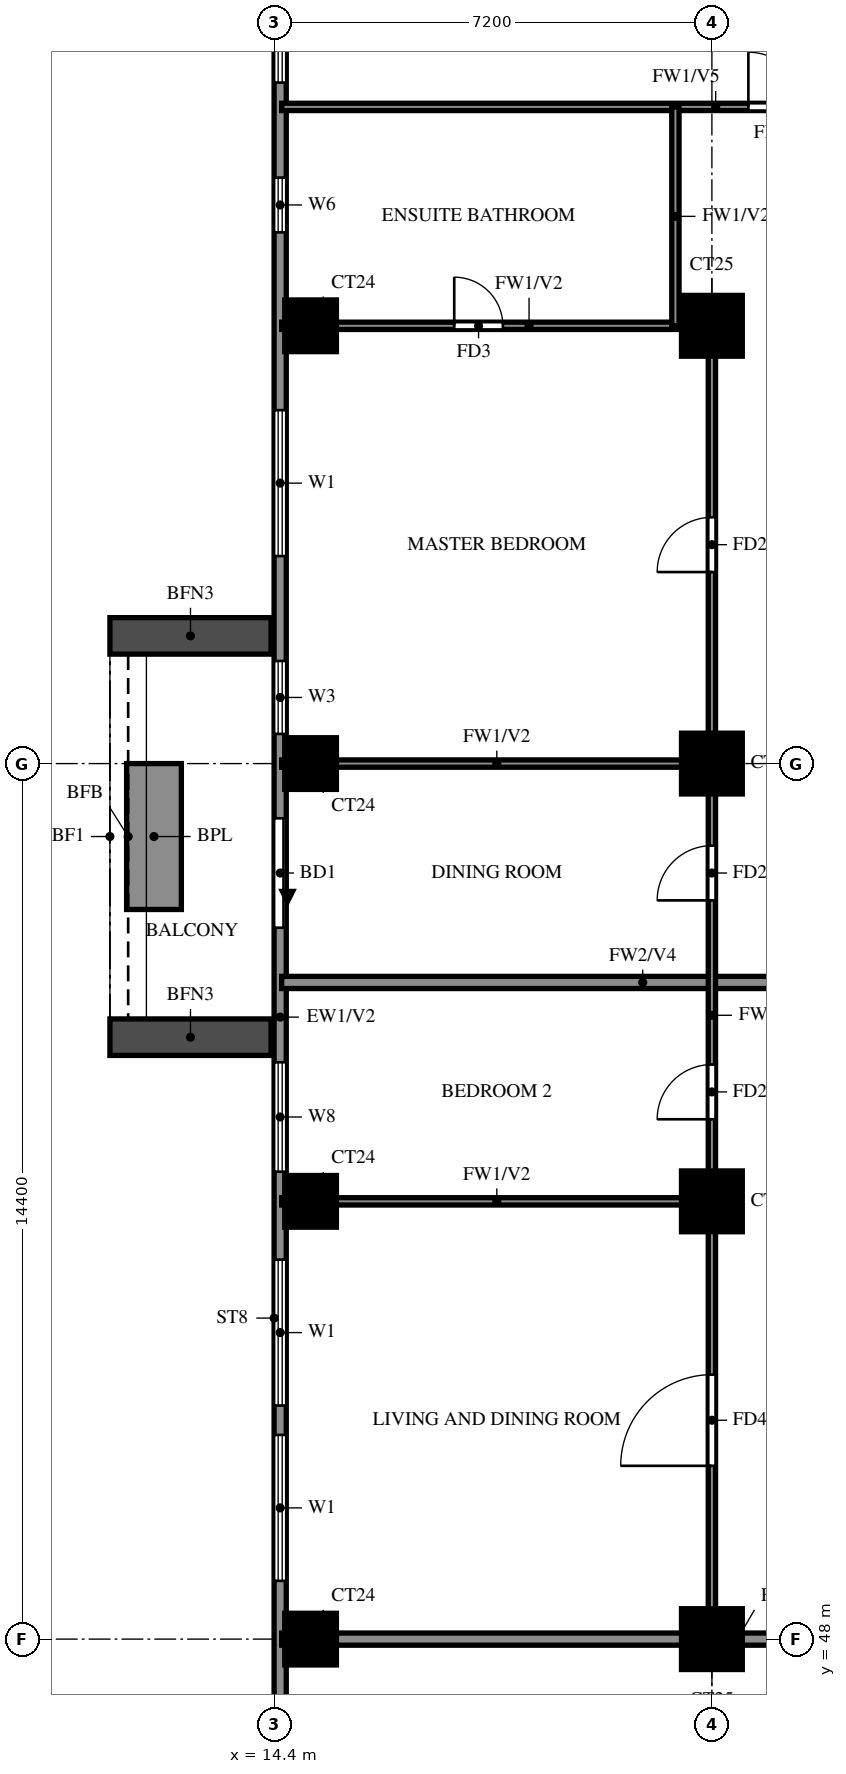
"""IFC4 building model, lengths in metres.
Left out: names, types, materials, properties, quantities, classifications, styles, units other than length and angle.
Written with IfcOpenShell. Run it as: python <this file> out.ifc"""

import sys

from ifc_helpers import new_model, si_unit, direction, frame, frame_2d, origin, origin_2d, place, context, subcontext, project, spatial, rectangle, extrude, source, transform, mapped, element, fill, save


model = new_model("IFC4")
c1 = context("Model", 3, precision=1e-05, world=origin(), true_north=direction((0.0, 1.0)))
c2 = subcontext(c1, "Body", "Model", "MODEL_VIEW")
j1 = project(units=[si_unit("LENGTHUNIT", "METRE"), si_unit("PLANEANGLEUNIT", "RADIAN")], contexts=[c1])
p1 = place(None, origin())
s1 = spatial("IfcSite", under=j1, at=p1, CompositionType="ELEMENT")
p2 = place(p1, origin())
s2 = spatial("IfcBuilding", under=s1, at=p2, CompositionType="ELEMENT")
p3 = place(p2, frame((0.0, 0.0, 160.5)))
s3 = spatial("IfcBuildingStorey", under=s2, at=p3, CompositionType="ELEMENT", Elevation=160.5)
m1 = source(origin(), c2, "Body", "SweptSolid", [
    extrude(rectangle(XDim=0.85, YDim=0.85, at=origin_2d()), origin(), (0.0, 0.0, 1.0), 3.2),
])
p4 = place(p3, frame((15.0, 48.0, 0.0), z_axis=(0.0, 0.0, 1.0), x_axis=(1.0, 0.0, 0.0)))
e1 = element("IfcColumn", 1, at=p4, inside=s3, PredefinedType="COLUMN", context=c2, shape_type="MappedRepresentation", body=[
    mapped(m1, transform((0.0, 0.0, 0.0))),
])
m2 = source(origin(), c2, "Body", "SweptSolid", [
    extrude(rectangle(XDim=1.0, YDim=1.0, at=origin_2d()), origin(), (0.0, 0.0, 1.0), 3.2),
])
p5 = place(p3, frame((21.6, 48.0, 0.0), z_axis=(0.0, 0.0, 1.0), x_axis=(1.0, 0.0, 0.0)))
e2 = element("IfcColumn", 2, at=p5, inside=s3, PredefinedType="COLUMN", context=c2, shape_type="MappedRepresentation", body=[
    mapped(m2, transform((0.0, 0.0, 0.0))),
])
p6 = place(p3, frame((15.0, 55.2, 0.0), z_axis=(0.0, 0.0, 1.0), x_axis=(1.0, 0.0, 0.0)))
e3 = element("IfcColumn", 3, at=p6, inside=s3, PredefinedType="COLUMN", context=c2, shape_type="MappedRepresentation", body=[
    mapped(m1, transform((0.0, 0.0, 0.0))),
])
p7 = place(p3, frame((21.6, 55.2, 0.0), z_axis=(0.0, 0.0, 1.0), x_axis=(1.0, 0.0, 0.0)))
e4 = element("IfcColumn", 4, at=p7, inside=s3, PredefinedType="COLUMN", context=c2, shape_type="MappedRepresentation", body=[
    mapped(m2, transform((0.0, 0.0, 0.0))),
])
p8 = place(p3, frame((15.0, 62.4, 0.0), z_axis=(0.0, 0.0, 1.0), x_axis=(1.0, 0.0, 0.0)))
e5 = element("IfcColumn", 5, at=p8, inside=s3, PredefinedType="COLUMN", context=c2, shape_type="MappedRepresentation", body=[
    mapped(m1, transform((0.0, 0.0, 0.0))),
])
p9 = place(p3, frame((21.6, 62.4, 0.0), z_axis=(0.0, 0.0, 1.0), x_axis=(1.0, 0.0, 0.0)))
e6 = element("IfcColumn", 6, at=p9, inside=s3, PredefinedType="COLUMN", context=c2, shape_type="MappedRepresentation", body=[
    mapped(m2, transform((0.0, 0.0, 0.0))),
])
p10 = place(p3, frame((15.0, 69.6, 0.0), z_axis=(0.0, 0.0, 1.0), x_axis=(1.0, 0.0, 0.0)))
e7 = element("IfcColumn", 7, at=p10, inside=s3, PredefinedType="COLUMN", context=c2, shape_type="MappedRepresentation", body=[
    mapped(m1, transform((0.0, 0.0, 0.0))),
])
p11 = place(p3, frame((21.6, 69.6, 0.0), z_axis=(0.0, 0.0, 1.0), x_axis=(1.0, 0.0, 0.0)))
e8 = element("IfcColumn", 8, at=p11, inside=s3, PredefinedType="COLUMN", context=c2, shape_type="MappedRepresentation", body=[
    mapped(m2, transform((0.0, 0.0, 0.0))),
])
p12 = place(p3, frame((14.5, 76.6, 0.0), z_axis=(0.0, 0.0, 1.0), x_axis=(0.0, -1.0, 0.0)))
e9 = element("IfcWall", 9, at=p12, inside=s3, PredefinedType="SOLIDWALL", context=c2, shape_type="SweptSolid", body=[
    extrude(rectangle(XDim=33.4, YDim=0.2, at=frame_2d((16.7, 0.0))), origin(), (0.0, 0.0, 1.0), 3.2),
])
p13 = place(p12, frame((15.1, 0.0, 0.0)))
e10 = element("IfcOpeningElement", 10, at=p13, cuts=e9, PredefinedType="OPENING", context=c2, shape_type="SweptSolid", body=[
    extrude(rectangle(XDim=1.8, YDim=2.4, at=frame_2d((0.9, 1.2))), frame((0.0, 0.11, 0.0), z_axis=(0.0, -1.0, 0.0), x_axis=(1.0, 0.0, 0.0)), (0.0, 0.0, 1.0), 0.22),
])
p14 = place(p12, frame((29.887, 0.0, 0.6)))
e11 = element("IfcOpeningElement", 11, at=p14, cuts=e9, PredefinedType="OPENING", context=c2, shape_type="SweptSolid", body=[
    extrude(rectangle(XDim=2.4, YDim=2.4, at=frame_2d((1.2, 1.2))), frame((0.0, 0.11, 0.0), z_axis=(0.0, -1.0, 0.0), x_axis=(1.0, 0.0, 0.0)), (0.0, 0.0, 1.0), 0.22),
])
p15 = place(p12, frame((22.358, 0.0, 0.6)))
e12 = element("IfcOpeningElement", 12, at=p15, cuts=e9, PredefinedType="OPENING", context=c2, shape_type="SweptSolid", body=[
    extrude(rectangle(XDim=2.4, YDim=2.4, at=frame_2d((1.2, 1.2))), frame((0.0, 0.11, 0.0), z_axis=(0.0, -1.0, 0.0), x_axis=(1.0, 0.0, 0.0)), (0.0, 0.0, 1.0), 0.22),
])
p16 = place(p12, frame((25.242, 0.0, 0.6)))
e13 = element("IfcOpeningElement", 13, at=p16, cuts=e9, PredefinedType="OPENING", context=c2, shape_type="SweptSolid", body=[
    extrude(rectangle(XDim=2.4, YDim=2.4, at=frame_2d((1.2, 1.2))), frame((0.0, 0.11, 0.0), z_axis=(0.0, -1.0, 0.0), x_axis=(1.0, 0.0, 0.0)), (0.0, 0.0, 1.0), 0.22),
])
p17 = place(p12, frame((19.113, 0.0, 0.6)))
e14 = element("IfcOpeningElement", 14, at=p17, cuts=e9, PredefinedType="OPENING", context=c2, shape_type="SweptSolid", body=[
    extrude(rectangle(XDim=1.8, YDim=2.4, at=frame_2d((0.9, 1.2))), frame((0.0, 0.11, 0.0), z_axis=(0.0, -1.0, 0.0), x_axis=(1.0, 0.0, 0.0)), (0.0, 0.0, 1.0), 0.22),
])
p18 = place(p12, frame((8.387, 0.0, 0.6)))
e15 = element("IfcOpeningElement", 15, at=p18, cuts=e9, PredefinedType="OPENING", context=c2, shape_type="SweptSolid", body=[
    extrude(rectangle(XDim=2.4, YDim=2.4, at=frame_2d((1.2, 1.2))), frame((0.0, 0.11, 0.0), z_axis=(0.0, -1.0, 0.0), x_axis=(1.0, 0.0, 0.0)), (0.0, 0.0, 1.0), 0.22),
])
p19 = place(p12, frame((12.512, 0.0, 0.6)))
e16 = element("IfcOpeningElement", 16, at=p19, cuts=e9, PredefinedType="OPENING", context=c2, shape_type="SweptSolid", body=[
    extrude(rectangle(XDim=1.2, YDim=2.4, at=frame_2d((0.6, 1.2))), frame((0.0, 0.11, 0.0), z_axis=(0.0, -1.0, 0.0), x_axis=(1.0, 0.0, 0.0)), (0.0, 0.0, 1.0), 0.22),
])
p20 = place(p12, frame((4.562, 0.0, 1.5)))
e17 = element("IfcOpeningElement", 17, at=p20, cuts=e9, PredefinedType="OPENING", context=c2, shape_type="SweptSolid", body=[
    extrude(rectangle(XDim=0.9, YDim=0.9, at=frame_2d((0.45, 0.45))), frame((0.0, 0.11, 0.0), z_axis=(0.0, -1.0, 0.0), x_axis=(1.0, 0.0, 0.0)), (0.0, 0.0, 1.0), 0.22),
])
p21 = place(p12, frame((0.6, 0.0, 0.6)))
e18 = element("IfcOpeningElement", 18, at=p21, cuts=e9, PredefinedType="OPENING", context=c2, shape_type="SweptSolid", body=[
    extrude(rectangle(XDim=2.4, YDim=2.4, at=frame_2d((1.2, 1.2))), frame((0.0, 0.11, 0.0), z_axis=(0.0, -1.0, 0.0), x_axis=(1.0, 0.0, 0.0)), (0.0, 0.0, 1.0), 0.22),
])
for number, where, z_axis, x_axis in (
    (19, (14.35, 64.5, 0.0), (0.0, 0.0, 1.0), (-1.0, 0.0, 0.0)),
    (20, (14.35, 57.9, 0.0), (0.0, 0.0, 1.0), (-1.0, 0.0, 0.0)),
):
    element("IfcWall", number, at=place(p3, frame(where, z_axis=z_axis, x_axis=x_axis)), inside=s3, PredefinedType="SOLIDWALL", context=c2, shape_type="SweptSolid", body=[
        extrude(rectangle(XDim=2.65, YDim=0.6, at=frame_2d((1.325, 0.0))), origin(), (0.0, 0.0, 1.0), 2.85),
    ])
p22 = place(p3, frame((12.425, 62.4, 0.0), z_axis=(0.0, 0.0, 1.0), x_axis=(0.0, -1.0, 0.0)))
e21 = element("IfcWall", 21, at=p22, inside=s3, PredefinedType="SOLIDWALL", context=c2, shape_type="SweptSolid", body=[
    extrude(rectangle(XDim=2.4, YDim=0.9, at=frame_2d((1.2, 0.0))), origin(), (0.0, 0.0, 1.0), 0.9),
])
p23 = place(p3, frame((14.525, 48.0, 0.0), z_axis=(0.0, 0.0, 1.0), x_axis=(1.0, 0.0, 0.0)))
e22 = element("IfcWall", 22, at=p23, inside=s3, PredefinedType="SOLIDWALL", context=c2, shape_type="SweptSolid", body=[
    extrude(rectangle(XDim=14.275, YDim=0.2, at=frame_2d((7.138, 0.0))), origin(), (0.0, 0.0, 1.0), 3.2),
])
p24 = place(p3, frame((14.525, 58.8, 0.0), z_axis=(0.0, 0.0, 1.0), x_axis=(1.0, 0.0, 0.0)))
e23 = element("IfcWall", 23, at=p24, inside=s3, PredefinedType="SOLIDWALL", context=c2, shape_type="SweptSolid", body=[
    extrude(rectangle(XDim=11.875, YDim=0.2, at=frame_2d((5.938, 0.0))), origin(), (0.0, 0.0, 1.0), 2.3),
])
for number, where, z_axis, x_axis in (
    (24, (14.525, 55.2, 0.0), (0.0, 0.0, 1.0), (1.0, 0.0, 0.0)),
    (25, (14.525, 62.4, 0.0), (0.0, 0.0, 1.0), (1.0, 0.0, 0.0)),
):
    element("IfcWall", number, at=place(p3, frame(where, z_axis=z_axis, x_axis=x_axis)), inside=s3, PredefinedType="PARTITIONING", context=c2, shape_type="SweptSolid", body=[
        extrude(rectangle(XDim=7.075, YDim=0.12, at=frame_2d((3.538, 0.0))), origin(), (0.0, 0.0, 1.0), 3.2),
    ])
p25 = place(p3, frame((14.525, 69.6, 0.0), z_axis=(0.0, 0.0, 1.0), x_axis=(1.0, 0.0, 0.0)))
e26 = element("IfcWall", 26, at=p25, inside=s3, PredefinedType="PARTITIONING", context=c2, shape_type="SweptSolid", body=[
    extrude(rectangle(XDim=7.075, YDim=0.12, at=frame_2d((3.538, 0.0))), origin(), (0.0, 0.0, 1.0), 3.2),
])
p26 = place(p25, frame((2.837, 0.0, 0.0)))
e27 = element("IfcOpeningElement", 27, at=p26, cuts=e26, PredefinedType="OPENING", context=c2, shape_type="SweptSolid", body=[
    extrude(rectangle(XDim=0.8, YDim=2.1, at=frame_2d((0.4, 1.05))), frame((0.0, 0.07, 0.0), z_axis=(0.0, -1.0, 0.0), x_axis=(1.0, 0.0, 0.0)), (0.0, 0.0, 1.0), 0.14),
])
p27 = place(p3, frame((14.525, 73.2, 0.0), z_axis=(0.0, 0.0, 1.0), x_axis=(1.0, 0.0, 0.0)))
e28 = element("IfcWall", 28, at=p27, inside=s3, PredefinedType="PARTITIONING", context=c2, shape_type="SweptSolid", body=[
    extrude(rectangle(XDim=14.275, YDim=0.12, at=frame_2d((7.138, 0.0))), origin(), (0.0, 0.0, 1.0), 2.3),
])
p28 = place(p27, frame((7.675, 0.0, 0.0)))
e29 = element("IfcOpeningElement", 29, at=p28, cuts=e28, PredefinedType="OPENING", context=c2, shape_type="SweptSolid", body=[
    extrude(rectangle(XDim=0.9, YDim=2.1, at=frame_2d((0.45, 1.05))), frame((0.0, 0.07, 0.0), z_axis=(0.0, -1.0, 0.0), x_axis=(1.0, 0.0, 0.0)), (0.0, 0.0, 1.0), 0.14),
])
p29 = place(p3, frame((21.0, 69.6, 0.0), z_axis=(0.0, 0.0, 1.0), x_axis=(0.0, 1.0, 0.0)))
e30 = element("IfcWall", 30, at=p29, inside=s3, PredefinedType="PARTITIONING", context=c2, shape_type="SweptSolid", body=[
    extrude(rectangle(XDim=3.6, YDim=0.12, at=frame_2d((1.8, 0.0))), origin(), (0.0, 0.0, 1.0), 3.2),
])
p30 = place(p3, frame((21.6, 48.0, 0.0), z_axis=(0.0, 0.0, 1.0), x_axis=(0.0, 1.0, 0.0)))
e31 = element("IfcWall", 31, at=p30, inside=s3, PredefinedType="PARTITIONING", context=c2, shape_type="SweptSolid", body=[
    extrude(rectangle(XDim=21.6, YDim=0.12, at=frame_2d((10.8, 0.0))), origin(), (0.0, 0.0, 1.0), 3.2),
])
p31 = place(p30, frame((2.85, 0.0, 0.0)))
e32 = element("IfcOpeningElement", 32, at=p31, cuts=e31, PredefinedType="OPENING", context=c2, shape_type="SweptSolid", body=[
    extrude(rectangle(XDim=1.5, YDim=2.1, at=frame_2d((0.75, 1.05))), frame((0.0, 0.07, 0.0), z_axis=(0.0, -1.0, 0.0), x_axis=(1.0, 0.0, 0.0)), (0.0, 0.0, 1.0), 0.14),
])
p32 = place(p30, frame((8.55, 0.0, 0.0)))
e33 = element("IfcOpeningElement", 33, at=p32, cuts=e31, PredefinedType="OPENING", context=c2, shape_type="SweptSolid", body=[
    extrude(rectangle(XDim=0.9, YDim=2.1, at=frame_2d((0.45, 1.05))), frame((0.0, 0.07, 0.0), z_axis=(0.0, -1.0, 0.0), x_axis=(1.0, 0.0, 0.0)), (0.0, 0.0, 1.0), 0.14),
])
p33 = place(p30, frame((12.15, 0.0, 0.0)))
e34 = element("IfcOpeningElement", 34, at=p33, cuts=e31, PredefinedType="OPENING", context=c2, shape_type="SweptSolid", body=[
    extrude(rectangle(XDim=0.9, YDim=2.1, at=frame_2d((0.45, 1.05))), frame((0.0, 0.07, 0.0), z_axis=(0.0, -1.0, 0.0), x_axis=(1.0, 0.0, 0.0)), (0.0, 0.0, 1.0), 0.14),
])
p34 = place(p30, frame((17.55, 0.0, 0.0)))
e35 = element("IfcOpeningElement", 35, at=p34, cuts=e31, PredefinedType="OPENING", context=c2, shape_type="SweptSolid", body=[
    extrude(rectangle(XDim=0.9, YDim=2.1, at=frame_2d((0.45, 1.05))), frame((0.0, 0.07, 0.0), z_axis=(0.0, -1.0, 0.0), x_axis=(1.0, 0.0, 0.0)), (0.0, 0.0, 1.0), 0.14),
])
p35 = place(p13, origin())
e36 = element("IfcDoor", 36, at=p35, inside=s3, OperationType="DOUBLE_DOOR_SLIDING", PredefinedType="DOOR", context=c2, shape_type="SweptSolid", body=[
    extrude(rectangle(XDim=1.8, YDim=2.4, at=frame_2d((0.9, 1.2))), frame((0.0, 0.025, 0.0), z_axis=(0.0, -1.0, 0.0), x_axis=(1.0, 0.0, 0.0)), (0.0, 0.0, 1.0), 0.05),
])
fill(e10, e36)
p36 = place(p15, origin())
e37 = element("IfcWindow", 37, at=p36, inside=s3, PartitioningType="DOUBLE_PANEL_VERTICAL", PredefinedType="WINDOW", context=c2, shape_type="SweptSolid", body=[
    extrude(rectangle(XDim=2.4, YDim=2.4, at=frame_2d((1.2, 1.2))), frame((0.0, 0.03, 0.0), z_axis=(0.0, -1.0, 0.0), x_axis=(1.0, 0.0, 0.0)), (0.0, 0.0, 1.0), 0.06),
])
fill(e12, e37)
p37 = place(p16, origin())
e38 = element("IfcWindow", 38, at=p37, inside=s3, PartitioningType="DOUBLE_PANEL_VERTICAL", PredefinedType="WINDOW", context=c2, shape_type="SweptSolid", body=[
    extrude(rectangle(XDim=2.4, YDim=2.4, at=frame_2d((1.2, 1.2))), frame((0.0, 0.03, 0.0), z_axis=(0.0, -1.0, 0.0), x_axis=(1.0, 0.0, 0.0)), (0.0, 0.0, 1.0), 0.06),
])
fill(e13, e38)
p38 = place(p17, origin())
e39 = element("IfcWindow", 39, at=p38, inside=s3, PartitioningType="DOUBLE_PANEL_VERTICAL", PredefinedType="WINDOW", context=c2, shape_type="SweptSolid", body=[
    extrude(rectangle(XDim=1.8, YDim=2.4, at=frame_2d((0.9, 1.2))), frame((0.0, 0.03, 0.0), z_axis=(0.0, -1.0, 0.0), x_axis=(1.0, 0.0, 0.0)), (0.0, 0.0, 1.0), 0.06),
])
fill(e14, e39)
p39 = place(p18, origin())
e40 = element("IfcWindow", 40, at=p39, inside=s3, PartitioningType="DOUBLE_PANEL_VERTICAL", PredefinedType="WINDOW", context=c2, shape_type="SweptSolid", body=[
    extrude(rectangle(XDim=2.4, YDim=2.4, at=frame_2d((1.2, 1.2))), frame((0.0, 0.03, 0.0), z_axis=(0.0, -1.0, 0.0), x_axis=(1.0, 0.0, 0.0)), (0.0, 0.0, 1.0), 0.06),
])
fill(e15, e40)
p40 = place(p19, origin())
e41 = element("IfcWindow", 41, at=p40, inside=s3, PartitioningType="SINGLE_PANEL", PredefinedType="WINDOW", context=c2, shape_type="SweptSolid", body=[
    extrude(rectangle(XDim=1.2, YDim=2.4, at=frame_2d((0.6, 1.2))), frame((0.0, 0.03, 0.0), z_axis=(0.0, -1.0, 0.0), x_axis=(1.0, 0.0, 0.0)), (0.0, 0.0, 1.0), 0.06),
])
fill(e16, e41)
p41 = place(p20, origin())
e42 = element("IfcWindow", 42, at=p41, inside=s3, PartitioningType="SINGLE_PANEL", PredefinedType="WINDOW", context=c2, shape_type="SweptSolid", body=[
    extrude(rectangle(XDim=0.9, YDim=0.9, at=frame_2d((0.45, 0.45))), frame((0.0, 0.03, 0.0), z_axis=(0.0, -1.0, 0.0), x_axis=(1.0, 0.0, 0.0)), (0.0, 0.0, 1.0), 0.06),
])
fill(e17, e42)
p42 = place(p21, origin())
e43 = element("IfcWindow", 43, at=p42, inside=s3, PartitioningType="DOUBLE_PANEL_VERTICAL", PredefinedType="WINDOW", context=c2, shape_type="SweptSolid", body=[
    extrude(rectangle(XDim=2.4, YDim=2.4, at=frame_2d((1.2, 1.2))), frame((0.0, 0.03, 0.0), z_axis=(0.0, -1.0, 0.0), x_axis=(1.0, 0.0, 0.0)), (0.0, 0.0, 1.0), 0.06),
])
fill(e18, e43)
p43 = place(p31, origin())
e44 = element("IfcDoor", 44, at=p43, inside=s3, OperationType="SINGLE_SWING_LEFT", PredefinedType="DOOR", context=c2, shape_type="SweptSolid", body=[
    extrude(rectangle(XDim=1.5, YDim=2.1, at=frame_2d((0.75, 1.05))), frame((0.0, 0.025, 0.0), z_axis=(0.0, -1.0, 0.0), x_axis=(1.0, 0.0, 0.0)), (0.0, 0.0, 1.0), 0.05),
])
fill(e32, e44)
p44 = place(p32, origin())
e45 = element("IfcDoor", 45, at=p44, inside=s3, OperationType="SINGLE_SWING_RIGHT", PredefinedType="DOOR", context=c2, shape_type="SweptSolid", body=[
    extrude(rectangle(XDim=0.9, YDim=2.1, at=frame_2d((0.45, 1.05))), frame((0.0, 0.025, 0.0), z_axis=(0.0, -1.0, 0.0), x_axis=(1.0, 0.0, 0.0)), (0.0, 0.0, 1.0), 0.05),
])
fill(e33, e45)
p45 = place(p33, origin())
e46 = element("IfcDoor", 46, at=p45, inside=s3, OperationType="SINGLE_SWING_LEFT", PredefinedType="DOOR", context=c2, shape_type="SweptSolid", body=[
    extrude(rectangle(XDim=0.9, YDim=2.1, at=frame_2d((0.45, 1.05))), frame((0.0, 0.025, 0.0), z_axis=(0.0, -1.0, 0.0), x_axis=(1.0, 0.0, 0.0)), (0.0, 0.0, 1.0), 0.05),
])
fill(e34, e46)
p46 = place(p34, origin())
e47 = element("IfcDoor", 47, at=p46, inside=s3, OperationType="SINGLE_SWING_LEFT", PredefinedType="DOOR", context=c2, shape_type="SweptSolid", body=[
    extrude(rectangle(XDim=0.9, YDim=2.1, at=frame_2d((0.45, 1.05))), frame((0.0, 0.025, 0.0), z_axis=(0.0, -1.0, 0.0), x_axis=(1.0, 0.0, 0.0)), (0.0, 0.0, 1.0), 0.05),
])
fill(e35, e47)
p47 = place(p26, origin())
e48 = element("IfcDoor", 48, at=p47, inside=s3, OperationType="SINGLE_SWING_RIGHT", PredefinedType="DOOR", context=c2, shape_type="SweptSolid", body=[
    extrude(rectangle(XDim=0.8, YDim=2.1, at=frame_2d((0.4, 1.05))), frame((0.0, 0.025, 0.0), z_axis=(0.0, -1.0, 0.0), x_axis=(1.0, 0.0, 0.0)), (0.0, 0.0, 1.0), 0.05),
])
fill(e27, e48)
p48 = place(p28, origin())
e49 = element("IfcDoor", 49, at=p48, inside=s3, OperationType="SINGLE_SWING_LEFT", PredefinedType="DOOR", context=c2, shape_type="SweptSolid", body=[
    extrude(rectangle(XDim=0.9, YDim=2.1, at=frame_2d((0.45, 1.05))), frame((0.0, 0.025, 0.0), z_axis=(0.0, -1.0, 0.0), x_axis=(1.0, 0.0, 0.0)), (0.0, 0.0, 1.0), 0.05),
])
fill(e29, e49)
save(model, sys.argv[1])
